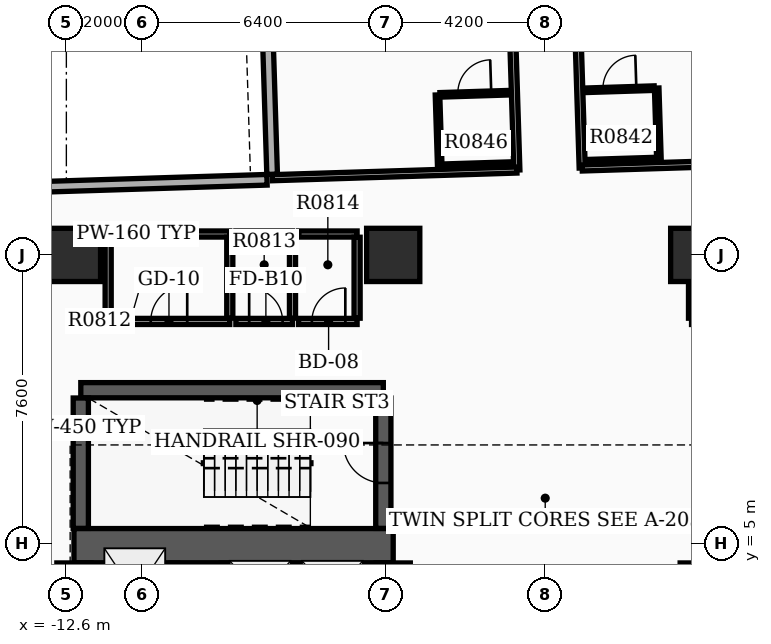
"""IFC4 building model, lengths in metres.
Left out: names, types, materials, properties, quantities, classifications, styles, units other than length and angle.
Written with IfcOpenShell. Run it as: python <this file> out.ifc"""

import sys

from ifc_helpers import new_model, si_unit, direction, frame, frame_2d, origin, origin_2d, place, context, subcontext, project, spatial, rectangle, extrude, element, fill, save


model = new_model("IFC4")
c1 = context("Model", 3, precision=1e-05, world=origin(), true_north=direction((0.0, 1.0)))
c2 = subcontext(c1, "Body", "Model", "MODEL_VIEW")
j1 = project(units=[si_unit("LENGTHUNIT", "METRE"), si_unit("PLANEANGLEUNIT", "RADIAN")], contexts=[c1])
p1 = place(None, origin())
s1 = spatial("IfcSite", under=j1, at=p1, CompositionType="ELEMENT")
p2 = place(p1, origin())
s2 = spatial("IfcBuilding", under=s1, at=p2, CompositionType="ELEMENT")
p3 = place(p2, frame((0.0, 0.0, 56.1)))
s3 = spatial("IfcBuildingStorey", under=s2, at=p3, CompositionType="ELEMENT", Elevation=56.1)
p4 = place(p3, frame((-12.4, 4.95, 0.0), z_axis=(0.0, 0.0, 1.0), x_axis=(1.0, 0.0, 0.0)))
e1 = element("IfcWall", 1, at=p4, inside=s3, PredefinedType="SHEAR", context=c2, shape_type="SweptSolid", body=[
    extrude(rectangle(XDim=8.4, YDim=0.9, at=frame_2d((4.2, 0.0))), origin(), (0.0, 0.0, 1.0), 3.7),
])
p5 = place(p3, frame((-12.4, -6.395, 0.0), z_axis=(0.0, 0.0, 1.0), x_axis=(0.0, 1.0, 0.0)))
e2 = element("IfcWall", 2, at=p5, inside=s3, PredefinedType="SHEAR", context=c2, shape_type="SweptSolid", body=[
    extrude(rectangle(XDim=10.89, YDim=0.9, at=frame_2d((5.445, 0.0))), origin(), (0.0, 0.0, 1.0), 3.7),
])
p6 = place(p3, frame((-4.0, -6.395, 0.0), z_axis=(0.0, 0.0, 1.0), x_axis=(0.0, 1.0, 0.0)))
e3 = element("IfcWall", 3, at=p6, inside=s3, PredefinedType="SHEAR", context=c2, shape_type="SweptSolid", body=[
    extrude(rectangle(XDim=10.89, YDim=0.9, at=frame_2d((5.445, 0.0))), origin(), (0.0, 0.0, 1.0), 3.7),
])
p7 = place(p6, frame((1.145, 0.0, 0.0)))
e4 = element("IfcOpeningElement", 4, at=p7, cuts=e3, PredefinedType="OPENING", context=c2, shape_type="SweptSolid", body=[
    extrude(rectangle(XDim=1.05, YDim=2.15, at=frame_2d((0.525, 1.075))), frame((0.0, 0.46, 0.0), z_axis=(0.0, -1.0, 0.0), x_axis=(1.0, 0.0, 0.0)), (0.0, 0.0, 1.0), 0.92),
])
p8 = place(p6, frame((6.745, 0.0, 0.0)))
e5 = element("IfcOpeningElement", 5, at=p8, cuts=e3, PredefinedType="OPENING", context=c2, shape_type="SweptSolid", body=[
    extrude(rectangle(XDim=1.05, YDim=2.15, at=frame_2d((0.525, 1.075))), frame((0.0, 0.46, 0.0), z_axis=(0.0, -1.0, 0.0), x_axis=(1.0, 0.0, 0.0)), (0.0, 0.0, 1.0), 0.92),
])
p9 = place(p3, frame((4.0, -6.395, 0.0), z_axis=(0.0, 0.0, 1.0), x_axis=(0.0, 1.0, 0.0)))
e6 = element("IfcWall", 6, at=p9, inside=s3, PredefinedType="SHEAR", context=c2, shape_type="SweptSolid", body=[
    extrude(rectangle(XDim=10.89, YDim=0.9, at=frame_2d((5.445, 0.0))), origin(), (0.0, 0.0, 1.0), 3.7),
])
p10 = place(p9, frame((1.145, 0.0, 0.0)))
e7 = element("IfcOpeningElement", 7, at=p10, cuts=e6, PredefinedType="OPENING", context=c2, shape_type="SweptSolid", body=[
    extrude(rectangle(XDim=1.05, YDim=2.15, at=frame_2d((0.525, 1.075))), frame((0.0, 0.46, 0.0), z_axis=(0.0, -1.0, 0.0), x_axis=(1.0, 0.0, 0.0)), (0.0, 0.0, 1.0), 0.92),
])
p11 = place(p9, frame((6.745, 0.0, 0.0)))
e8 = element("IfcOpeningElement", 8, at=p11, cuts=e6, PredefinedType="OPENING", context=c2, shape_type="SweptSolid", body=[
    extrude(rectangle(XDim=1.05, YDim=2.15, at=frame_2d((0.525, 1.075))), frame((0.0, 0.46, 0.0), z_axis=(0.0, -1.0, 0.0), x_axis=(1.0, 0.0, 0.0)), (0.0, 0.0, 1.0), 0.92),
])
p12 = place(p3, frame((-12.22, 9.04, 0.0), z_axis=(0.0, 0.0, 1.0), x_axis=(1.0, 0.0, 0.0)))
e9 = element("IfcWall", 9, at=p12, inside=s3, PredefinedType="SHEAR", context=c2, shape_type="SweptSolid", body=[
    extrude(rectangle(XDim=7.96, YDim=0.4, at=frame_2d((3.98, 0.0))), origin(), (0.0, 0.0, 1.0), 3.7),
])
p13 = place(p3, frame((-12.22, 5.405, 0.0), z_axis=(0.0, 0.0, 1.0), x_axis=(0.0, 1.0, 0.0)))
e10 = element("IfcWall", 10, at=p13, inside=s3, PredefinedType="SHEAR", context=c2, shape_type="SweptSolid", body=[
    extrude(rectangle(XDim=3.43, YDim=0.4, at=frame_2d((1.715, 0.0))), origin(), (0.0, 0.0, 1.0), 3.7),
])
p14 = place(p3, frame((-4.26, 5.405, 0.0), z_axis=(0.0, 0.0, 1.0), x_axis=(0.0, 1.0, 0.0)))
e11 = element("IfcWall", 11, at=p14, inside=s3, PredefinedType="SHEAR", context=c2, shape_type="SweptSolid", body=[
    extrude(rectangle(XDim=3.43, YDim=0.4, at=frame_2d((1.715, 0.0))), origin(), (0.0, 0.0, 1.0), 3.7),
])
p15 = place(p14, frame((1.195, 0.0, 0.0)))
e12 = element("IfcOpeningElement", 12, at=p15, cuts=e11, PredefinedType="OPENING", context=c2, shape_type="SweptSolid", body=[
    extrude(rectangle(XDim=1.05, YDim=2.15, at=frame_2d((0.525, 1.075))), frame((0.0, 0.21, 0.0), z_axis=(0.0, -1.0, 0.0), x_axis=(1.0, 0.0, 0.0)), (0.0, 0.0, 1.0), 0.42),
])
for number, where, z_axis, x_axis in (
    (13, (-12.4, 12.6, 0.0), (0.0, 0.0, 1.0), (1.0, 0.0, 0.0)),
    (14, (4.0, 12.6, 0.0), (0.0, 0.0, 1.0), (1.0, 0.0, 0.0)),
    (15, (-4.0, 12.6, 0.0), (0.0, 0.0, 1.0), (1.0, 0.0, 0.0)),
):
    element("IfcColumn", number, at=place(p3, frame(where, z_axis=z_axis, x_axis=x_axis)), inside=s3, PredefinedType="COLUMN", context=c2, shape_type="SweptSolid", body=[
        extrude(rectangle(XDim=1.4, YDim=1.4, at=origin_2d()), origin(), (0.0, 0.0, 1.0), 3.9),
    ])
p16 = place(p3, frame((-7.817, 34.812, 0.0), z_axis=(0.0, 0.0, 1.0), x_axis=(0.031410322165, -0.999506574096, 0.0)))
e16 = element("IfcWall", 16, at=p16, inside=s3, PredefinedType="STANDARD", context=c2, shape_type="SweptSolid", body=[
    extrude(rectangle(XDim=20.1, YDim=0.28, at=frame_2d((10.05, 0.0))), origin(), (0.0, 0.0, 1.0), 2.91),
])
p17 = place(p16, frame((0.85, 0.0, 0.8)))
e17 = element("IfcOpeningElement", 17, at=p17, cuts=e16, PredefinedType="OPENING", context=c2, shape_type="SweptSolid", body=[
    extrude(rectangle(XDim=1.2, YDim=1.6, at=frame_2d((0.6, 0.8))), frame((0.0, 0.15, 0.0), z_axis=(0.0, -1.0, 0.0), x_axis=(1.0, 0.0, 0.0)), (0.0, 0.0, 1.0), 0.3),
])
p18 = place(p16, frame((4.05, 0.0, 0.8)))
e18 = element("IfcOpeningElement", 18, at=p18, cuts=e16, PredefinedType="OPENING", context=c2, shape_type="SweptSolid", body=[
    extrude(rectangle(XDim=1.2, YDim=1.6, at=frame_2d((0.6, 0.8))), frame((0.0, 0.15, 0.0), z_axis=(0.0, -1.0, 0.0), x_axis=(1.0, 0.0, 0.0)), (0.0, 0.0, 1.0), 0.3),
])
p19 = place(p16, frame((7.25, 0.0, 0.8)))
e19 = element("IfcOpeningElement", 19, at=p19, cuts=e16, PredefinedType="OPENING", context=c2, shape_type="SweptSolid", body=[
    extrude(rectangle(XDim=1.2, YDim=1.6, at=frame_2d((0.6, 0.8))), frame((0.0, 0.15, 0.0), z_axis=(0.0, -1.0, 0.0), x_axis=(1.0, 0.0, 0.0)), (0.0, 0.0, 1.0), 0.3),
])
p20 = place(p16, frame((10.95, 0.0, 0.8)))
e20 = element("IfcOpeningElement", 20, at=p20, cuts=e16, PredefinedType="OPENING", context=c2, shape_type="SweptSolid", body=[
    extrude(rectangle(XDim=1.2, YDim=1.6, at=frame_2d((0.6, 0.8))), frame((0.0, 0.15, 0.0), z_axis=(0.0, -1.0, 0.0), x_axis=(1.0, 0.0, 0.0)), (0.0, 0.0, 1.0), 0.3),
])
p21 = place(p3, frame((-13.618, 14.379, 0.0), z_axis=(0.0, 0.0, 1.0), x_axis=(0.999507224741, 0.031389611199, 0.0)))
e21 = element("IfcWall", 21, at=p21, inside=s3, PredefinedType="STANDARD", context=c2, shape_type="SweptSolid", body=[
    extrude(rectangle(XDim=6.3, YDim=0.28, at=frame_2d((3.15, 0.0))), origin(), (0.0, 0.0, 1.0), 2.91),
])
for number, where, z_axis, x_axis in (
    (22, (-9.76, 2.5, 0.0), (0.0, 0.0, 1.0), (0.0, 1.0, 0.0)),
    (23, (-8.44, 2.5, 0.0), (0.0, 0.0, 1.0), (0.0, 1.0, 0.0)),
):
    element("IfcWall", number, at=place(p3, frame(where, z_axis=z_axis, x_axis=x_axis)), inside=s3, PredefinedType="SOLIDWALL", context=c2, shape_type="SweptSolid", body=[
        extrude(rectangle(XDim=1.99, YDim=0.18, at=frame_2d((0.995, 0.0))), origin(), (0.0, 0.0, 1.0), 2.9),
    ])
p22 = place(p3, frame((-11.5, 10.85, 0.0), z_axis=(0.0, 0.0, 1.0), x_axis=(1.0, 0.0, 0.0)))
e24 = element("IfcWall", 24, at=p22, inside=s3, PredefinedType="PARTITIONING", context=c2, shape_type="SweptSolid", body=[
    extrude(rectangle(XDim=3.2, YDim=0.16, at=frame_2d((1.6, 0.0))), origin(), (0.0, 0.0, 1.0), 2.9),
])
p23 = place(p22, frame((1.12, 0.0, 0.0)))
e25 = element("IfcOpeningElement", 25, at=p23, cuts=e24, PredefinedType="OPENING", context=c2, shape_type="SweptSolid", body=[
    extrude(rectangle(XDim=0.96, YDim=2.15, at=frame_2d((0.48, 1.075))), frame((0.0, 0.09, 0.0), z_axis=(0.0, -1.0, 0.0), x_axis=(1.0, 0.0, 0.0)), (0.0, 0.0, 1.0), 0.18),
])
p24 = place(p3, frame((-11.5, 13.15, 0.0), z_axis=(0.0, 0.0, 1.0), x_axis=(1.0, 0.0, 0.0)))
e26 = element("IfcWall", 26, at=p24, inside=s3, PredefinedType="PARTITIONING", context=c2, shape_type="SweptSolid", body=[
    extrude(rectangle(XDim=3.2, YDim=0.16, at=frame_2d((1.6, 0.0))), origin(), (0.0, 0.0, 1.0), 2.9),
])
for number, where, z_axis, x_axis in (
    (27, (-11.5, 10.935, 0.0), (0.0, 0.0, 1.0), (0.0, 1.0, 0.0)),
    (28, (-8.3, 10.935, 0.0), (0.0, 0.0, 1.0), (0.0, 1.0, 0.0)),
):
    element("IfcWall", number, at=place(p3, frame(where, z_axis=z_axis, x_axis=x_axis)), inside=s3, PredefinedType="PARTITIONING", context=c2, shape_type="SweptSolid", body=[
        extrude(rectangle(XDim=2.13, YDim=0.16, at=frame_2d((1.065, 0.0))), origin(), (0.0, 0.0, 1.0), 2.9),
    ])
p25 = place(p3, frame((-8.14, 10.85, 0.0), z_axis=(0.0, 0.0, 1.0), x_axis=(1.0, 0.0, 0.0)))
e29 = element("IfcWall", 29, at=p25, inside=s3, PredefinedType="PARTITIONING", context=c2, shape_type="SweptSolid", body=[
    extrude(rectangle(XDim=1.49, YDim=0.16, at=frame_2d((0.745, 0.0))), origin(), (0.0, 0.0, 1.0), 2.9),
])
p26 = place(p25, frame((0.35, 0.0, 0.0)))
e30 = element("IfcOpeningElement", 30, at=p26, cuts=e29, PredefinedType="OPENING", context=c2, shape_type="SweptSolid", body=[
    extrude(rectangle(XDim=0.88, YDim=2.1, at=frame_2d((0.44, 1.05))), frame((0.0, 0.09, 0.0), z_axis=(0.0, -1.0, 0.0), x_axis=(1.0, 0.0, 0.0)), (0.0, 0.0, 1.0), 0.18),
])
p27 = place(p3, frame((-8.14, 13.15, 0.0), z_axis=(0.0, 0.0, 1.0), x_axis=(1.0, 0.0, 0.0)))
e31 = element("IfcWall", 31, at=p27, inside=s3, PredefinedType="PARTITIONING", context=c2, shape_type="SweptSolid", body=[
    extrude(rectangle(XDim=1.49, YDim=0.16, at=frame_2d((0.745, 0.0))), origin(), (0.0, 0.0, 1.0), 2.9),
])
p28 = place(p3, frame((-6.65, 10.935, 0.0), z_axis=(0.0, 0.0, 1.0), x_axis=(0.0, 1.0, 0.0)))
e32 = element("IfcWall", 32, at=p28, inside=s3, PredefinedType="PARTITIONING", context=c2, shape_type="SweptSolid", body=[
    extrude(rectangle(XDim=2.13, YDim=0.16, at=frame_2d((1.065, 0.0))), origin(), (0.0, 0.0, 1.0), 2.9),
])
p29 = place(p3, frame((-6.49, 10.85, 0.0), z_axis=(0.0, 0.0, 1.0), x_axis=(1.0, 0.0, 0.0)))
e33 = element("IfcWall", 33, at=p29, inside=s3, PredefinedType="PARTITIONING", context=c2, shape_type="SweptSolid", body=[
    extrude(rectangle(XDim=1.54, YDim=0.16, at=frame_2d((0.77, 0.0))), origin(), (0.0, 0.0, 1.0), 2.9),
])
p30 = place(p29, frame((0.35, 0.0, 0.0)))
e34 = element("IfcOpeningElement", 34, at=p30, cuts=e33, PredefinedType="OPENING", context=c2, shape_type="SweptSolid", body=[
    extrude(rectangle(XDim=0.88, YDim=2.15, at=frame_2d((0.44, 1.075))), frame((0.0, 0.09, 0.0), z_axis=(0.0, -1.0, 0.0), x_axis=(1.0, 0.0, 0.0)), (0.0, 0.0, 1.0), 0.18),
])
p31 = place(p3, frame((-6.49, 13.15, 0.0), z_axis=(0.0, 0.0, 1.0), x_axis=(1.0, 0.0, 0.0)))
e35 = element("IfcWall", 35, at=p31, inside=s3, PredefinedType="PARTITIONING", context=c2, shape_type="SweptSolid", body=[
    extrude(rectangle(XDim=1.54, YDim=0.16, at=frame_2d((0.77, 0.0))), origin(), (0.0, 0.0, 1.0), 2.9),
])
p32 = place(p3, frame((-4.95, 10.935, 0.0), z_axis=(0.0, 0.0, 1.0), x_axis=(0.0, 1.0, 0.0)))
e36 = element("IfcWall", 36, at=p32, inside=s3, PredefinedType="PARTITIONING", context=c2, shape_type="SweptSolid", body=[
    extrude(rectangle(XDim=2.13, YDim=0.16, at=frame_2d((1.065, 0.0))), origin(), (0.0, 0.0, 1.0), 2.9),
])
p33 = place(p3, frame((3.85, 10.85, 0.0), z_axis=(0.0, 0.0, 1.0), x_axis=(1.0, 0.0, 0.0)))
e37 = element("IfcWall", 37, at=p33, inside=s3, PredefinedType="PARTITIONING", context=c2, shape_type="SweptSolid", body=[
    extrude(rectangle(XDim=8.55, YDim=0.16, at=frame_2d((4.275, 0.0))), origin(), (0.0, 0.0, 1.0), 2.9),
])
p34 = place(p33, frame((3.795, 0.0, 0.0)))
e38 = element("IfcOpeningElement", 38, at=p34, cuts=e37, PredefinedType="OPENING", context=c2, shape_type="SweptSolid", body=[
    extrude(rectangle(XDim=0.96, YDim=2.15, at=frame_2d((0.48, 1.075))), frame((0.0, 0.09, 0.0), z_axis=(0.0, -1.0, 0.0), x_axis=(1.0, 0.0, 0.0)), (0.0, 0.0, 1.0), 0.18),
])
p35 = place(p3, frame((3.85, 13.15, 0.0), z_axis=(0.0, 0.0, 1.0), x_axis=(1.0, 0.0, 0.0)))
e39 = element("IfcWall", 39, at=p35, inside=s3, PredefinedType="PARTITIONING", context=c2, shape_type="SweptSolid", body=[
    extrude(rectangle(XDim=8.55, YDim=0.16, at=frame_2d((4.275, 0.0))), origin(), (0.0, 0.0, 1.0), 2.9),
])
p36 = place(p3, frame((3.85, 10.935, 0.0), z_axis=(0.0, 0.0, 1.0), x_axis=(0.0, 1.0, 0.0)))
e40 = element("IfcWall", 40, at=p36, inside=s3, PredefinedType="PARTITIONING", context=c2, shape_type="SweptSolid", body=[
    extrude(rectangle(XDim=2.13, YDim=0.16, at=frame_2d((1.065, 0.0))), origin(), (0.0, 0.0, 1.0), 2.9),
])
p37 = place(p3, frame((0.973, 14.888, 0.0), z_axis=(0.0, 0.0, 1.0), x_axis=(-0.031416030536, 0.99950639469, 0.0)))
e41 = element("IfcWall", 41, at=p37, inside=s3, PredefinedType="PARTITIONING", context=c2, shape_type="SweptSolid", body=[
    extrude(rectangle(XDim=20.182, YDim=0.16, at=frame_2d((10.091, 0.0))), origin(), (0.0, 0.0, 1.0), 2.9),
])
p38 = place(p37, frame((8.047, 0.0, 0.0)))
e42 = element("IfcOpeningElement", 42, at=p38, cuts=e41, PredefinedType="OPENING", context=c2, shape_type="SweptSolid", body=[
    extrude(rectangle(XDim=0.96, YDim=2.15, at=frame_2d((0.48, 1.075))), frame((0.0, 0.09, 0.0), z_axis=(0.0, -1.0, 0.0), x_axis=(1.0, 0.0, 0.0)), (0.0, 0.0, 1.0), 0.18),
])
p39 = place(p37, frame((16.243, 0.0, 0.0)))
e43 = element("IfcOpeningElement", 43, at=p39, cuts=e41, PredefinedType="OPENING", context=c2, shape_type="SweptSolid", body=[
    extrude(rectangle(XDim=0.96, YDim=2.15, at=frame_2d((0.48, 1.075))), frame((0.0, 0.09, 0.0), z_axis=(0.0, -1.0, 0.0), x_axis=(1.0, 0.0, 0.0)), (0.0, 0.0, 1.0), 0.18),
])
p40 = place(p3, frame((0.973, 14.888, 0.0), z_axis=(0.0, 0.0, 1.0), x_axis=(0.99950701053, 0.031396431354, 0.0)))
e44 = element("IfcWall", 44, at=p40, inside=s3, PredefinedType="PARTITIONING", context=c2, shape_type="SweptSolid", body=[
    extrude(rectangle(XDim=5.28, YDim=0.16, at=frame_2d((2.64, 0.0))), origin(), (0.0, 0.0, 1.0), 2.9),
])
p41 = place(p3, frame((1.049, 16.931, 0.0), z_axis=(0.0, 0.0, 1.0), x_axis=(0.999507353951, 0.031385496622, 0.0)))
e45 = element("IfcWall", 45, at=p41, inside=s3, PredefinedType="PARTITIONING", context=c2, shape_type="SweptSolid", body=[
    extrude(rectangle(XDim=1.82, YDim=0.12, at=frame_2d((0.91, 0.0))), origin(), (0.0, 0.0, 1.0), 2.9),
])
p42 = place(p41, frame((0.47, 0.0, 0.0)))
e46 = element("IfcOpeningElement", 46, at=p42, cuts=e45, PredefinedType="OPENING", context=c2, shape_type="SweptSolid", body=[
    extrude(rectangle(XDim=0.88, YDim=2.1, at=frame_2d((0.44, 1.05))), frame((0.0, 0.07, 0.0), z_axis=(0.0, -1.0, 0.0), x_axis=(1.0, 0.0, 0.0)), (0.0, 0.0, 1.0), 0.14),
])
p43 = place(p3, frame((1.108, 15.052, 0.0), z_axis=(0.0, 0.0, 1.0), x_axis=(0.999507221803, 0.031389704724, 0.0)))
e47 = element("IfcWall", 47, at=p43, inside=s3, PredefinedType="PARTITIONING", context=c2, shape_type="SweptSolid", body=[
    extrude(rectangle(XDim=1.82, YDim=0.12, at=frame_2d((0.91, 0.0))), origin(), (0.0, 0.0, 1.0), 2.9),
])
p44 = place(p3, frame((2.992, 15.111, 0.0), z_axis=(0.0, 0.0, 1.0), x_axis=(-0.031295563454, 0.999510173889, 0.0)))
e48 = element("IfcWall", 48, at=p44, inside=s3, PredefinedType="PARTITIONING", context=c2, shape_type="SweptSolid", body=[
    extrude(rectangle(XDim=1.88, YDim=0.12, at=frame_2d((0.94, 0.0))), origin(), (0.0, 0.0, 1.0), 2.9),
])
p45 = place(p3, frame((-0.746, 14.834, 0.0), z_axis=(0.0, 0.0, 1.0), x_axis=(-0.031416030536, 0.99950639469, 0.0)))
e49 = element("IfcWall", 49, at=p45, inside=s3, PredefinedType="PARTITIONING", context=c2, shape_type="SweptSolid", body=[
    extrude(rectangle(XDim=20.182, YDim=0.16, at=frame_2d((10.091, 0.0))), origin(), (0.0, 0.0, 1.0), 2.9),
])
p46 = place(p45, frame((8.047, 0.0, 0.0)))
e50 = element("IfcOpeningElement", 50, at=p46, cuts=e49, PredefinedType="OPENING", context=c2, shape_type="SweptSolid", body=[
    extrude(rectangle(XDim=0.96, YDim=2.15, at=frame_2d((0.48, 1.075))), frame((0.0, 0.09, 0.0), z_axis=(0.0, -1.0, 0.0), x_axis=(1.0, 0.0, 0.0)), (0.0, 0.0, 1.0), 0.18),
])
p47 = place(p45, frame((16.243, 0.0, 0.0)))
e51 = element("IfcOpeningElement", 51, at=p47, cuts=e49, PredefinedType="OPENING", context=c2, shape_type="SweptSolid", body=[
    extrude(rectangle(XDim=0.96, YDim=2.15, at=frame_2d((0.48, 1.075))), frame((0.0, 0.09, 0.0), z_axis=(0.0, -1.0, 0.0), x_axis=(1.0, 0.0, 0.0)), (0.0, 0.0, 1.0), 0.18),
])
p48 = place(p3, frame((-0.746, 14.834, 0.0), z_axis=(0.0, 0.0, 1.0), x_axis=(-0.999506028801, -0.031427669178, 0.0)))
e52 = element("IfcWall", 52, at=p48, inside=s3, PredefinedType="PARTITIONING", context=c2, shape_type="SweptSolid", body=[
    extrude(rectangle(XDim=6.44, YDim=0.16, at=frame_2d((3.22, 0.0))), origin(), (0.0, 0.0, 1.0), 2.9),
])
p49 = place(p3, frame((-2.769, 16.811, 0.0), z_axis=(0.0, 0.0, 1.0), x_axis=(0.999507221803, 0.031389704724, 0.0)))
e53 = element("IfcWall", 53, at=p49, inside=s3, PredefinedType="PARTITIONING", context=c2, shape_type="SweptSolid", body=[
    extrude(rectangle(XDim=1.82, YDim=0.12, at=frame_2d((0.91, 0.0))), origin(), (0.0, 0.0, 1.0), 2.9),
])
p50 = place(p49, frame((0.47, 0.0, 0.0)))
e54 = element("IfcOpeningElement", 54, at=p50, cuts=e53, PredefinedType="OPENING", context=c2, shape_type="SweptSolid", body=[
    extrude(rectangle(XDim=0.88, YDim=2.1, at=frame_2d((0.44, 1.05))), frame((0.0, 0.07, 0.0), z_axis=(0.0, -1.0, 0.0), x_axis=(1.0, 0.0, 0.0)), (0.0, 0.0, 1.0), 0.14),
])
p51 = place(p3, frame((-2.71, 14.932, 0.0), z_axis=(0.0, 0.0, 1.0), x_axis=(0.999503004171, 0.03152371574, 0.0)))
e55 = element("IfcWall", 55, at=p51, inside=s3, PredefinedType="PARTITIONING", context=c2, shape_type="SweptSolid", body=[
    extrude(rectangle(XDim=1.82, YDim=0.12, at=frame_2d((0.91, 0.0))), origin(), (0.0, 0.0, 1.0), 2.9),
])
p52 = place(p3, frame((-2.775, 14.93, 0.0), z_axis=(0.0, 0.0, 1.0), x_axis=(-0.031425292588, 0.999506103526, 0.0)))
e56 = element("IfcWall", 56, at=p52, inside=s3, PredefinedType="PARTITIONING", context=c2, shape_type="SweptSolid", body=[
    extrude(rectangle(XDim=1.88, YDim=0.12, at=frame_2d((0.94, 0.0))), origin(), (0.0, 0.0, 1.0), 2.9),
])
p53 = place(p15, origin())
e57 = element("IfcDoor", 57, at=p53, inside=s3, OperationType="SINGLE_SWING_RIGHT", PredefinedType="DOOR", context=c2, shape_type="SweptSolid", body=[
    extrude(rectangle(XDim=1.05, YDim=2.15, at=frame_2d((0.525, 1.075))), frame((0.0, 0.025, 0.0), z_axis=(0.0, -1.0, 0.0), x_axis=(1.0, 0.0, 0.0)), (0.0, 0.0, 1.0), 0.05),
])
fill(e12, e57)
p54 = place(p23, origin())
e58 = element("IfcDoor", 58, at=p54, inside=s3, OperationType="SINGLE_SWING_RIGHT", PredefinedType="DOOR", context=c2, shape_type="SweptSolid", body=[
    extrude(rectangle(XDim=0.96, YDim=2.15, at=frame_2d((0.48, 1.075))), frame((0.0, 0.025, 0.0), z_axis=(0.0, -1.0, 0.0), x_axis=(1.0, 0.0, 0.0)), (0.0, 0.0, 1.0), 0.05),
])
fill(e25, e58)
p55 = place(p26, origin())
e59 = element("IfcDoor", 59, at=p55, inside=s3, OperationType="SINGLE_SWING_LEFT", PredefinedType="DOOR", context=c2, shape_type="SweptSolid", body=[
    extrude(rectangle(XDim=0.88, YDim=2.1, at=frame_2d((0.44, 1.05))), frame((0.0, 0.025, 0.0), z_axis=(0.0, -1.0, 0.0), x_axis=(1.0, 0.0, 0.0)), (0.0, 0.0, 1.0), 0.05),
])
fill(e30, e59)
p56 = place(p30, origin())
e60 = element("IfcDoor", 60, at=p56, inside=s3, OperationType="SINGLE_SWING_RIGHT", PredefinedType="DOOR", context=c2, shape_type="SweptSolid", body=[
    extrude(rectangle(XDim=0.88, YDim=2.15, at=frame_2d((0.44, 1.075))), frame((0.0, 0.025, 0.0), z_axis=(0.0, -1.0, 0.0), x_axis=(1.0, 0.0, 0.0)), (0.0, 0.0, 1.0), 0.05),
])
fill(e34, e60)
p57 = place(p42, origin())
e61 = element("IfcDoor", 61, at=p57, inside=s3, OperationType="SINGLE_SWING_RIGHT", PredefinedType="DOOR", context=c2, shape_type="SweptSolid", body=[
    extrude(rectangle(XDim=0.88, YDim=2.1, at=frame_2d((0.44, 1.05))), frame((0.0, 0.025, 0.0), z_axis=(0.0, -1.0, 0.0), x_axis=(1.0, 0.0, 0.0)), (0.0, 0.0, 1.0), 0.05),
])
fill(e46, e61)
p58 = place(p50, origin())
e62 = element("IfcDoor", 62, at=p58, inside=s3, OperationType="SINGLE_SWING_RIGHT", PredefinedType="DOOR", context=c2, shape_type="SweptSolid", body=[
    extrude(rectangle(XDim=0.88, YDim=2.1, at=frame_2d((0.44, 1.05))), frame((0.0, 0.025, 0.0), z_axis=(0.0, -1.0, 0.0), x_axis=(1.0, 0.0, 0.0)), (0.0, 0.0, 1.0), 0.05),
])
fill(e54, e62)
save(model, sys.argv[1])
